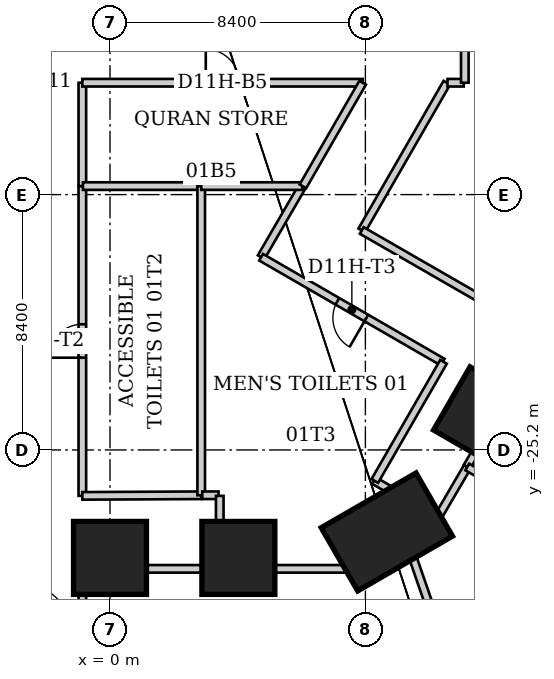
"""IFC4 building model, lengths in metres.
Left out: names, types, materials, properties, quantities, classifications, styles, units other than length and angle.
Written with IfcOpenShell. Run it as: python <this file> out.ifc"""

import sys

from ifc_helpers import new_model, si_unit, direction, frame, frame_2d, origin, origin_2d, place, context, subcontext, project, spatial, rectangle, extrude, element, fill, save


model = new_model("IFC4")
c1 = context("Model", 3, precision=1e-05, world=origin(), true_north=direction((0.0, 1.0)))
c2 = subcontext(c1, "Body", "Model", "MODEL_VIEW")
j1 = project(units=[si_unit("LENGTHUNIT", "METRE"), si_unit("PLANEANGLEUNIT", "RADIAN")], contexts=[c1])
p1 = place(None, origin())
s1 = spatial("IfcSite", under=j1, at=p1, CompositionType="ELEMENT")
p2 = place(p1, origin())
s2 = spatial("IfcBuilding", under=s1, at=p2, CompositionType="ELEMENT")
p3 = place(p2, frame((0.0, 0.0, 6.0)))
s3 = spatial("IfcBuildingStorey", under=s2, at=p3, CompositionType="ELEMENT", Elevation=6.0)
p4 = place(p3, frame((12.282, -24.105, 0.0), z_axis=(0.0, 0.0, 1.0), x_axis=(0.866025403784, -0.5, 0.0)))
e1 = element("IfcColumn", 1, at=p4, inside=s3, PredefinedType="COLUMN", context=c2, shape_type="SweptSolid", body=[
    extrude(rectangle(XDim=2.4, YDim=2.4, at=origin_2d()), origin(), (0.0, 0.0, 1.0), 6.0),
])
p5 = place(p3, frame((9.106, -27.897, 0.0), z_axis=(0.0, 0.0, 1.0), x_axis=(0.5, -0.866025403784, 0.0)))
e2 = element("IfcColumn", 2, at=p5, inside=s3, PredefinedType="COLUMN", context=c2, shape_type="SweptSolid", body=[
    extrude(rectangle(XDim=2.4, YDim=3.6, at=origin_2d()), origin(), (0.0, 0.0, 1.0), 6.0),
])
for number, where, z_axis, x_axis in (
    (3, (4.222, -28.751, 0.0), (0.0, 0.0, 1.0), (0.0, -1.0, 0.0)),
    (4, (0.0, -28.751, 0.0), (0.0, 0.0, 1.0), (0.0, -1.0, 0.0)),
):
    element("IfcColumn", number, at=place(p3, frame(where, z_axis=z_axis, x_axis=x_axis)), inside=s3, PredefinedType="COLUMN", context=c2, shape_type="SweptSolid", body=[
        extrude(rectangle(XDim=2.4, YDim=2.4, at=origin_2d()), origin(), (0.0, 0.0, 1.0), 6.0),
    ])
p6 = place(p3, frame((-0.91, -31.26, 0.0), z_axis=(0.0, 0.0, 1.0), x_axis=(0.0, 1.0, 0.0)))
e5 = element("IfcWall", 5, at=p6, inside=s3, PredefinedType="PARTITIONING", context=c2, shape_type="SweptSolid", body=[
    extrude(rectangle(XDim=2.15, YDim=0.25, at=frame_2d((1.075, 0.0))), origin(), (0.0, 0.0, 1.0), 5.84),
])
p7 = place(p3, frame((-0.91, -29.11, 0.0), z_axis=(0.0, 0.0, 1.0), x_axis=(1.0, 0.0, 0.0)))
e6 = element("IfcWall", 6, at=p7, inside=s3, PredefinedType="PARTITIONING", context=c2, shape_type="SweptSolid", body=[
    extrude(rectangle(XDim=4.52, YDim=0.25, at=frame_2d((2.26, 0.0))), origin(), (0.0, 0.0, 1.0), 4.04),
])
p8 = place(p3, frame((-0.91, -26.71, 0.0), z_axis=(0.0, 0.0, 1.0), x_axis=(0.0, 1.0, 0.0)))
e7 = element("IfcWall", 7, at=p8, inside=s3, PredefinedType="PARTITIONING", context=c2, shape_type="SweptSolid", body=[
    extrude(rectangle(XDim=10.19, YDim=0.25, at=frame_2d((5.095, 0.0))), origin(), (0.0, 0.0, 1.0), 5.84),
])
p9 = place(p8, frame((4.545, 0.0, 0.0)))
e8 = element("IfcOpeningElement", 8, at=p9, cuts=e7, PredefinedType="OPENING", context=c2, shape_type="SweptSolid", body=[
    extrude(rectangle(XDim=1.1, YDim=2.2, at=frame_2d((0.55, 1.1))), frame((0.0, 0.125, 0.0), z_axis=(0.0, -1.0, 0.0), x_axis=(1.0, 0.0, 0.0)), (0.0, 0.0, 1.0), 0.25),
])
p10 = place(p3, frame((-0.91, -26.71, 0.0), z_axis=(0.0, 0.0, 1.0), x_axis=(0.999986892035, 0.005120132697, 0.0)))
e9 = element("IfcWall", 9, at=p10, inside=s3, PredefinedType="PARTITIONING", context=c2, shape_type="SweptSolid", body=[
    extrude(rectangle(XDim=3.91, YDim=0.25, at=frame_2d((1.955, 0.0))), origin(), (0.0, 0.0, 1.0), 5.84),
])
p11 = place(p3, frame((-0.91, -16.52, 0.0), z_axis=(0.0, 0.0, 1.0), x_axis=(0.0, 1.0, 0.0)))
e10 = element("IfcWall", 10, at=p11, inside=s3, PredefinedType="PARTITIONING", context=c2, shape_type="SweptSolid", body=[
    extrude(rectangle(XDim=3.4, YDim=0.25, at=frame_2d((1.7, 0.0))), origin(), (0.0, 0.0, 1.0), 5.84),
])
p12 = place(p3, frame((-0.91, -13.12, 0.0), z_axis=(0.0, 0.0, 1.0), x_axis=(1.0, 0.0, 0.0)))
e11 = element("IfcWall", 11, at=p12, inside=s3, PredefinedType="PARTITIONING", context=c2, shape_type="SweptSolid", body=[
    extrude(rectangle(XDim=9.22, YDim=0.25, at=frame_2d((4.61, 0.0))), origin(), (0.0, 0.0, 1.0), 5.84),
])
p13 = place(p12, frame((4.06, 0.0, 0.0)))
e12 = element("IfcOpeningElement", 12, at=p13, cuts=e11, PredefinedType="OPENING", context=c2, shape_type="SweptSolid", body=[
    extrude(rectangle(XDim=1.1, YDim=2.2, at=frame_2d((0.55, 1.1))), frame((0.0, 0.125, 0.0), z_axis=(0.0, -1.0, 0.0), x_axis=(1.0, 0.0, 0.0)), (0.0, 0.0, 1.0), 0.25),
])
p14 = place(p3, frame((3.0, -16.52, 0.0), z_axis=(0.0, 0.0, 1.0), x_axis=(-1.0, 0.0, 0.0)))
e13 = element("IfcWall", 13, at=p14, inside=s3, PredefinedType="PARTITIONING", context=c2, shape_type="SweptSolid", body=[
    extrude(rectangle(XDim=3.89, YDim=0.25, at=frame_2d((1.945, 0.0))), origin(), (0.0, 0.0, 1.0), 5.84),
])
p15 = place(p3, frame((3.0, -16.52, 0.0), z_axis=(0.0, 0.0, 1.0), x_axis=(0.0, -1.0, 0.0)))
e14 = element("IfcWall", 14, at=p15, inside=s3, PredefinedType="PARTITIONING", context=c2, shape_type="SweptSolid", body=[
    extrude(rectangle(XDim=10.17, YDim=0.25, at=frame_2d((5.085, 0.0))), origin(), (0.0, 0.0, 1.0), 5.84),
])
p16 = place(p3, frame((3.035, -26.69, 0.0), z_axis=(0.0, 0.0, 1.0), x_axis=(1.0, 0.0, 0.0)))
e15 = element("IfcWall", 15, at=p16, inside=s3, PredefinedType="PARTITIONING", context=c2, shape_type="SweptSolid", body=[
    extrude(rectangle(XDim=0.535, YDim=0.25, at=frame_2d((0.268, 0.0))), origin(), (0.0, 0.0, 1.0), 5.84),
])
p17 = place(p3, frame((3.61, -29.11, 0.0), z_axis=(0.0, 0.0, 1.0), x_axis=(1.0, 0.0, 0.0)))
e16 = element("IfcWall", 16, at=p17, inside=s3, PredefinedType="PARTITIONING", context=c2, shape_type="SweptSolid", body=[
    extrude(rectangle(XDim=5.04, YDim=0.25, at=frame_2d((2.52, 0.0))), origin(), (0.0, 0.0, 1.0), 4.04),
])
p18 = place(p3, frame((3.61, -26.71, 0.0), z_axis=(0.0, 0.0, 1.0), x_axis=(0.0, -1.0, 0.0)))
e17 = element("IfcWall", 17, at=p18, inside=s3, PredefinedType="PARTITIONING", context=c2, shape_type="SweptSolid", body=[
    extrude(rectangle(XDim=2.4, YDim=0.25, at=frame_2d((1.2, 0.0))), origin(), (0.0, 0.0, 1.0), 5.84),
])
p19 = place(p3, frame((4.97, -18.86, 0.0), z_axis=(0.0, 0.0, 1.0), x_axis=(0.502507574725, 0.864572806271, 0.0)))
e18 = element("IfcWall", 18, at=p19, inside=s3, PredefinedType="PARTITIONING", context=c2, shape_type="SweptSolid", body=[
    extrude(rectangle(XDim=2.707, YDim=0.25, at=frame_2d((1.353, 0.0))), origin(), (0.0, 0.0, 1.0), 5.84),
])
p20 = place(p3, frame((6.33, -16.52, 0.0), z_axis=(0.0, 0.0, 1.0), x_axis=(-1.0, 0.0, 0.0)))
e19 = element("IfcWall", 19, at=p20, inside=s3, PredefinedType="PARTITIONING", context=c2, shape_type="SweptSolid", body=[
    extrude(rectangle(XDim=3.33, YDim=0.25, at=frame_2d((1.665, 0.0))), origin(), (0.0, 0.0, 1.0), 5.84),
])
p21 = place(p3, frame((8.28, -17.98, 0.0), z_axis=(0.0, 0.0, 1.0), x_axis=(0.499206132958, 0.866483258244, 0.0)))
e20 = element("IfcWall", 20, at=p21, inside=s3, PredefinedType="PARTITIONING", context=c2, shape_type="SweptSolid", body=[
    extrude(rectangle(XDim=5.609, YDim=0.25, at=frame_2d((2.804, 0.0))), origin(), (0.0, 0.0, 1.0), 5.84),
])
p22 = place(p3, frame((8.31, -13.12, 0.0), z_axis=(0.0, 0.0, 1.0), x_axis=(-0.499589939021, -0.866262023194, 0.0)))
e21 = element("IfcWall", 21, at=p22, inside=s3, PredefinedType="PARTITIONING", context=c2, shape_type="SweptSolid", body=[
    extrude(rectangle(XDim=3.934, YDim=0.25, at=frame_2d((1.967, 0.0))), origin(), (0.0, 0.0, 1.0), 5.84),
])
p23 = place(p3, frame((8.65, -29.11, 0.0), z_axis=(0.0, 0.0, 1.0), x_axis=(0.865736025111, 0.500500883941, 0.0)))
e22 = element("IfcWall", 22, at=p23, inside=s3, PredefinedType="PARTITIONING", context=c2, shape_type="SweptSolid", body=[
    extrude(rectangle(XDim=1.384, YDim=0.25, at=frame_2d((0.692, 0.0))), origin(), (0.0, 0.0, 1.0), 5.84),
])
p24 = place(p3, frame((8.69, -26.21, 0.0), z_axis=(0.0, 0.0, 1.0), x_axis=(0.865442434468, -0.5010083758, 0.0)))
e23 = element("IfcWall", 23, at=p24, inside=s3, PredefinedType="PARTITIONING", context=c2, shape_type="SweptSolid", body=[
    extrude(rectangle(XDim=2.415, YDim=0.25, at=frame_2d((1.208, 0.0))), origin(), (0.0, 0.0, 1.0), 5.84),
])
p25 = place(p3, frame((9.85, -28.42, 0.0), z_axis=(0.0, 0.0, 1.0), x_axis=(0.326921055124, -0.945051651349, 0.0)))
e24 = element("IfcWall", 24, at=p25, inside=s3, PredefinedType="PARTITIONING", context=c2, shape_type="SweptSolid", body=[
    extrude(rectangle(XDim=13.673, YDim=0.25, at=frame_2d((6.836, 0.0))), origin(), (0.0, 0.0, 1.0), 5.75),
])
p26 = place(p3, frame((10.38, -28.11, 0.0), z_axis=(0.0, 0.0, 1.0), x_axis=(-0.865714845822, -0.5005375168, 0.0)))
e25 = element("IfcWall", 25, at=p26, inside=s3, PredefinedType="PARTITIONING", context=c2, shape_type="SweptSolid", body=[
    extrude(rectangle(XDim=0.579, YDim=0.25, at=frame_2d((0.29, 0.0))), origin(), (0.0, 0.0, 1.0), 5.84),
])
p27 = place(p3, frame((10.78, -27.42, 0.0), z_axis=(0.0, 0.0, 1.0), x_axis=(0.504526221307, 0.863396370165, 0.0)))
e26 = element("IfcWall", 26, at=p27, inside=s3, PredefinedType="PARTITIONING", context=c2, shape_type="SweptSolid", body=[
    extrude(rectangle(XDim=1.923, YDim=0.25, at=frame_2d((0.961, 0.0))), origin(), (0.0, 0.0, 1.0), 5.84),
])
p28 = place(p3, frame((10.79, -27.42, 0.0), z_axis=(0.0, 0.0, 1.0), x_axis=(-0.510777713782, -0.859712816645, 0.0)))
e27 = element("IfcWall", 27, at=p28, inside=s3, PredefinedType="PARTITIONING", context=c2, shape_type="SweptSolid", body=[
    extrude(rectangle(XDim=0.802, YDim=0.25, at=frame_2d((0.401, 0.0))), origin(), (0.0, 0.0, 1.0), 5.84),
])
p29 = place(p3, frame((10.94, -22.31, 0.0), z_axis=(0.0, 0.0, 1.0), x_axis=(-0.865825192556, 0.500346615794, 0.0)))
e28 = element("IfcWall", 28, at=p29, inside=s3, PredefinedType="PARTITIONING", context=c2, shape_type="SweptSolid", body=[
    extrude(rectangle(XDim=6.895, YDim=0.25, at=frame_2d((3.448, 0.0))), origin(), (0.0, 0.0, 1.0), 5.84),
])
p30 = place(p29, frame((2.898, 0.0, 0.0)))
e29 = element("IfcOpeningElement", 29, at=p30, cuts=e28, PredefinedType="OPENING", context=c2, shape_type="SweptSolid", body=[
    extrude(rectangle(XDim=1.1, YDim=2.2, at=frame_2d((0.55, 1.1))), frame((0.0, 0.125, 0.0), z_axis=(0.0, -1.0, 0.0), x_axis=(1.0, 0.0, 0.0)), (0.0, 0.0, 1.0), 0.25),
])
p31 = place(p3, frame((10.97, -22.3, 0.0), z_axis=(0.0, 0.0, 1.0), x_axis=(-0.499476424687, -0.86632747918, 0.0)))
e30 = element("IfcWall", 30, at=p31, inside=s3, PredefinedType="PARTITIONING", context=c2, shape_type="SweptSolid", body=[
    extrude(rectangle(XDim=4.525, YDim=0.25, at=frame_2d((2.262, 0.0))), origin(), (0.0, 0.0, 1.0), 5.84),
])
p32 = place(p3, frame((11.1, -13.12, 0.0), z_axis=(0.0, 0.0, 1.0), x_axis=(1.0, 0.0, 0.0)))
e31 = element("IfcWall", 31, at=p32, inside=s3, PredefinedType="PARTITIONING", context=c2, shape_type="SweptSolid", body=[
    extrude(rectangle(XDim=0.535, YDim=0.25, at=frame_2d((0.268, 0.0))), origin(), (0.0, 0.0, 1.0), 5.84),
])
p33 = place(p3, frame((11.67, -13.12, 0.0), z_axis=(0.0, 0.0, 1.0), x_axis=(0.0, 1.0, 0.0)))
e32 = element("IfcWall", 32, at=p33, inside=s3, PredefinedType="PARTITIONING", context=c2, shape_type="SweptSolid", body=[
    extrude(rectangle(XDim=17.32, YDim=0.25, at=frame_2d((8.66, 0.0))), origin(), (0.0, 0.0, 1.0), 5.84),
])
p34 = place(p33, frame((7.86, 0.0, 0.0)))
e33 = element("IfcOpeningElement", 33, at=p34, cuts=e32, PredefinedType="OPENING", context=c2, shape_type="SweptSolid", body=[
    extrude(rectangle(XDim=1.6, YDim=2.4, at=frame_2d((0.8, 1.2))), frame((0.0, 0.125, 0.0), z_axis=(0.0, -1.0, 0.0), x_axis=(1.0, 0.0, 0.0)), (0.0, 0.0, 1.0), 0.25),
])
p35 = place(p3, frame((11.74, -25.76, 0.0), z_axis=(0.0, 0.0, 1.0), x_axis=(0.50150407689, 0.865155281359, 0.0)))
e34 = element("IfcWall", 34, at=p35, inside=s3, PredefinedType="PARTITIONING", context=c2, shape_type="SweptSolid", body=[
    extrude(rectangle(XDim=2.612, YDim=0.25, at=frame_2d((1.306, 0.0))), origin(), (0.0, 0.0, 1.0), 4.04),
])
p36 = place(p3, frame((12.17, -20.22, 0.0), z_axis=(0.0, 0.0, 1.0), x_axis=(-0.866588245704, 0.499023859558, 0.0)))
e35 = element("IfcWall", 35, at=p36, inside=s3, PredefinedType="PARTITIONING", context=c2, shape_type="SweptSolid", body=[
    extrude(rectangle(XDim=4.489, YDim=0.25, at=frame_2d((2.244, 0.0))), origin(), (0.0, 0.0, 1.0), 5.84),
])
p37 = place(p3, frame((20.894, -31.045, 0.0), z_axis=(0.0, 0.0, 1.0), x_axis=(-0.865795861716, 0.500397367933, 0.0)))
e36 = element("IfcWall", 36, at=p37, inside=s3, PredefinedType="PARTITIONING", context=c2, shape_type="SweptSolid", body=[
    extrude(rectangle(XDim=10.562, YDim=0.25, at=frame_2d((5.281, 0.0))), origin(), (0.0, 0.0, 1.0), 5.75),
])
p38 = place(p37, frame((4.481, 0.0, 0.0)))
e37 = element("IfcOpeningElement", 37, at=p38, cuts=e36, PredefinedType="OPENING", context=c2, shape_type="SweptSolid", body=[
    extrude(rectangle(XDim=1.6, YDim=2.4, at=frame_2d((0.8, 1.2))), frame((0.0, 0.125, 0.0), z_axis=(0.0, -1.0, 0.0), x_axis=(1.0, 0.0, 0.0)), (0.0, 0.0, 1.0), 0.25),
])
p39 = place(p13, origin())
e38 = element("IfcDoor", 38, at=p39, inside=s3, OperationType="SINGLE_SWING_LEFT", PredefinedType="DOOR", context=c2, shape_type="SweptSolid", body=[
    extrude(rectangle(XDim=1.1, YDim=2.2, at=frame_2d((0.55, 1.1))), frame((0.0, 0.025, 0.0), z_axis=(0.0, -1.0, 0.0), x_axis=(1.0, 0.0, 0.0)), (0.0, 0.0, 1.0), 0.05),
])
fill(e12, e38)
p40 = place(p9, origin())
e39 = element("IfcDoor", 39, at=p40, inside=s3, OperationType="SINGLE_SWING_LEFT", PredefinedType="DOOR", context=c2, shape_type="SweptSolid", body=[
    extrude(rectangle(XDim=1.1, YDim=2.2, at=frame_2d((0.55, 1.1))), frame((0.0, 0.025, 0.0), z_axis=(0.0, -1.0, 0.0), x_axis=(1.0, 0.0, 0.0)), (0.0, 0.0, 1.0), 0.05),
])
fill(e8, e39)
p41 = place(p30, origin())
e40 = element("IfcDoor", 40, at=p41, inside=s3, OperationType="SINGLE_SWING_LEFT", PredefinedType="DOOR", context=c2, shape_type="SweptSolid", body=[
    extrude(rectangle(XDim=1.1, YDim=2.2, at=frame_2d((0.55, 1.1))), frame((0.0, 0.025, 0.0), z_axis=(0.0, -1.0, 0.0), x_axis=(1.0, 0.0, 0.0)), (0.0, 0.0, 1.0), 0.05),
])
fill(e29, e40)
save(model, sys.argv[1])
